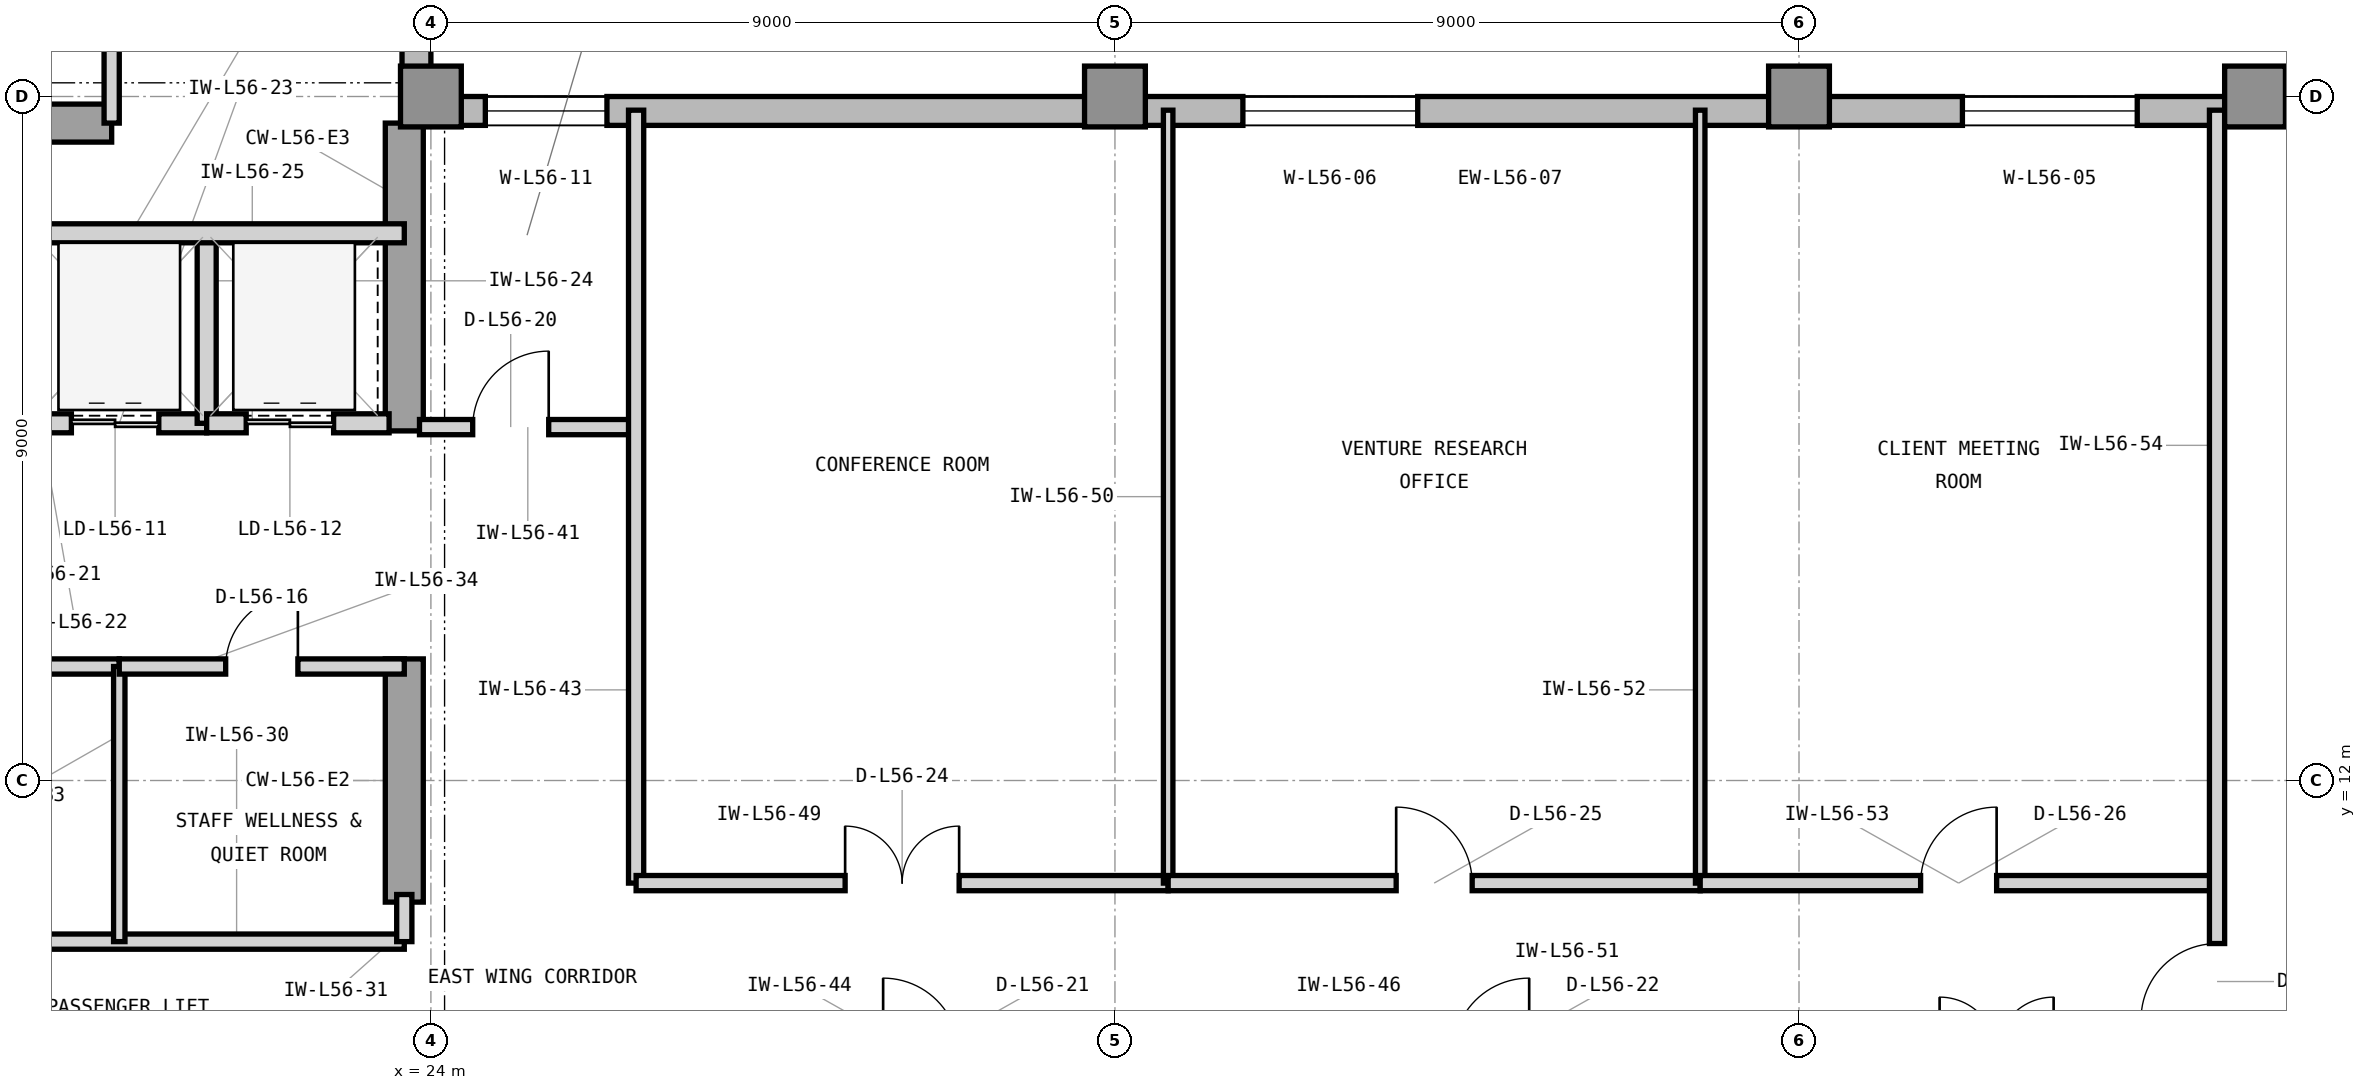
"""IFC4 building model, lengths in metres.
Left out: names, types, materials, properties, quantities, classifications, styles, units other than length and angle.
Written with IfcOpenShell. Run it as: python <this file> out.ifc"""

import sys

from ifc_helpers import new_model, si_unit, direction, frame, frame_2d, origin, origin_2d, place, context, subcontext, project, spatial, rectangle, extrude, element, fill, save


model = new_model("IFC4")
c1 = context("Model", 3, precision=1e-05, world=origin(), true_north=direction((0.0, 1.0)))
c2 = subcontext(c1, "Body", "Model", "MODEL_VIEW")
j1 = project(units=[si_unit("LENGTHUNIT", "METRE"), si_unit("PLANEANGLEUNIT", "RADIAN")], contexts=[c1])
p1 = place(None, origin())
s1 = spatial("IfcSite", under=j1, at=p1, CompositionType="ELEMENT")
p2 = place(p1, origin())
s2 = spatial("IfcBuilding", under=s1, at=p2, CompositionType="ELEMENT")
p3 = place(p2, frame((0.0, 0.0, 231.3)))
s3 = spatial("IfcBuildingStorey", under=s2, at=p3, CompositionType="ELEMENT", Elevation=231.3)
p4 = place(p3, frame((7.475, 20.65, 0.0), z_axis=(0.0, 0.0, 1.0), x_axis=(1.0, 0.0, 0.0)))
e1 = element("IfcWall", 1, at=p4, inside=s3, PredefinedType="SHEAR", context=c2, shape_type="SweptSolid", body=[
    extrude(rectangle(XDim=12.325, YDim=0.5, at=frame_2d((6.163, 0.0))), origin(), (0.0, 0.0, 1.0), 3.9),
])
p5 = place(p3, frame((23.65, 10.4, 0.0), z_axis=(0.0, 0.0, 1.0), x_axis=(0.0, 1.0, 0.0)))
e2 = element("IfcWall", 2, at=p5, inside=s3, PredefinedType="SHEAR", context=c2, shape_type="SweptSolid", body=[
    extrude(rectangle(XDim=3.2, YDim=0.5, at=frame_2d((1.6, 0.0))), origin(), (0.0, 0.0, 1.0), 3.9),
])
p6 = place(p3, frame((23.65, 16.6, 0.0), z_axis=(0.0, 0.0, 1.0), x_axis=(0.0, 1.0, 0.0)))
e3 = element("IfcWall", 3, at=p6, inside=s3, PredefinedType="SHEAR", context=c2, shape_type="SweptSolid", body=[
    extrude(rectangle(XDim=4.05, YDim=0.5, at=frame_2d((2.025, 0.0))), origin(), (0.0, 0.0, 1.0), 3.9),
])
for number, where, z_axis, x_axis in (
    (4, (24.0, 21.0, 0.0), (0.0, 0.0, 1.0), (1.0, 0.0, 0.0)),
    (5, (33.0, 21.0, 0.0), (0.0, 0.0, 1.0), (1.0, 0.0, 0.0)),
    (6, (42.0, 21.0, 0.0), (0.0, 0.0, 1.0), (1.0, 0.0, 0.0)),
    (7, (48.0, 21.0, 0.0), (0.0, 0.0, 1.0), (1.0, 0.0, 0.0)),
):
    element("IfcColumn", number, at=place(p3, frame(where, z_axis=z_axis, x_axis=x_axis)), inside=s3, PredefinedType="COLUMN", context=c2, shape_type="SweptSolid", body=[
        extrude(rectangle(XDim=0.8, YDim=0.8, at=origin_2d()), origin(), (0.0, 0.0, 1.0), 3.9),
    ])
p7 = place(p3, frame((52.4, 20.81, 0.0), z_axis=(0.0, 0.0, 1.0), x_axis=(-1.0, 0.0, 0.0)))
e8 = element("IfcWall", 8, at=p7, inside=s3, PredefinedType="STANDARD", context=c2, shape_type="SweptSolid", body=[
    extrude(rectangle(XDim=28.4, YDim=0.38, at=frame_2d((14.2, 0.0))), origin(), (0.0, 0.0, 1.0), 3.7),
])
p8 = place(p7, frame((5.95, 0.0, 0.9)))
e9 = element("IfcOpeningElement", 9, at=p8, cuts=e8, PredefinedType="OPENING", context=c2, shape_type="SweptSolid", body=[
    extrude(rectangle(XDim=2.3, YDim=2.2, at=frame_2d((1.15, 1.1))), frame((0.0, 0.2, 0.0), z_axis=(0.0, -1.0, 0.0), x_axis=(1.0, 0.0, 0.0)), (0.0, 0.0, 1.0), 0.4),
])
p9 = place(p7, frame((15.417, 0.0, 0.9)))
e10 = element("IfcOpeningElement", 10, at=p9, cuts=e8, PredefinedType="OPENING", context=c2, shape_type="SweptSolid", body=[
    extrude(rectangle(XDim=2.3, YDim=2.2, at=frame_2d((1.15, 1.1))), frame((0.0, 0.2, 0.0), z_axis=(0.0, -1.0, 0.0), x_axis=(1.0, 0.0, 0.0)), (0.0, 0.0, 1.0), 0.4),
])
p10 = place(p7, frame((26.084, 0.0, 0.9)))
e11 = element("IfcOpeningElement", 11, at=p10, cuts=e8, PredefinedType="OPENING", context=c2, shape_type="SweptSolid", body=[
    extrude(rectangle(XDim=1.6, YDim=2.2, at=frame_2d((0.8, 1.1))), frame((0.0, 0.2, 0.0), z_axis=(0.0, -1.0, 0.0), x_axis=(1.0, 0.0, 0.0)), (0.0, 0.0, 1.0), 0.4),
])
p11 = place(p3, frame((23.81, 21.0, 0.0), z_axis=(0.0, 0.0, 1.0), x_axis=(0.0, 1.0, 0.0)))
e12 = element("IfcWall", 12, at=p11, inside=s3, PredefinedType="STANDARD", context=c2, shape_type="SweptSolid", body=[
    extrude(rectangle(XDim=19.4, YDim=0.38, at=frame_2d((9.7, 0.0))), origin(), (0.0, 0.0, 1.0), 3.7),
])
p12 = place(p11, frame((10.975, 0.0, 0.9)))
e13 = element("IfcOpeningElement", 13, at=p12, cuts=e12, PredefinedType="OPENING", context=c2, shape_type="SweptSolid", body=[
    extrude(rectangle(XDim=2.3, YDim=2.2, at=frame_2d((1.15, 1.1))), frame((0.0, 0.2, 0.0), z_axis=(0.0, -1.0, 0.0), x_axis=(1.0, 0.0, 0.0)), (0.0, 0.0, 1.0), 0.4),
])
p13 = place(p3, frame((18.75, 16.7, 0.0), z_axis=(0.0, 0.0, 1.0), x_axis=(1.0, 0.0, 0.0)))
e14 = element("IfcWall", 14, at=p13, inside=s3, PredefinedType="PARTITIONING", context=c2, shape_type="SweptSolid", body=[
    extrude(rectangle(XDim=2.3, YDim=0.25, at=frame_2d((1.15, 0.0))), origin(), (0.0, 0.0, 1.0), 3.073),
])
p14 = place(p13, frame((0.52, 0.0, 0.0)))
e15 = element("IfcOpeningElement", 15, at=p14, cuts=e14, PredefinedType="OPENING", context=c2, shape_type="SweptSolid", body=[
    extrude(rectangle(XDim=1.15, YDim=2.25, at=frame_2d((0.575, 1.125))), frame((0.0, 0.135, 0.0), z_axis=(0.0, -1.0, 0.0), x_axis=(1.0, 0.0, 0.0)), (0.0, 0.0, 1.0), 0.27),
])
p15 = place(p3, frame((21.05, 16.7, 0.0), z_axis=(0.0, 0.0, 1.0), x_axis=(0.0, 1.0, 0.0)))
e16 = element("IfcWall", 16, at=p15, inside=s3, PredefinedType="PARTITIONING", context=c2, shape_type="SweptSolid", body=[
    extrude(rectangle(XDim=2.5, YDim=0.25, at=frame_2d((1.25, 0.0))), origin(), (0.0, 0.0, 1.0), 3.69),
])
p16 = place(p3, frame((21.05, 16.7, 0.0), z_axis=(0.0, 0.0, 1.0), x_axis=(1.0, 0.0, 0.0)))
e17 = element("IfcWall", 17, at=p16, inside=s3, PredefinedType="PARTITIONING", context=c2, shape_type="SweptSolid", body=[
    extrude(rectangle(XDim=2.4, YDim=0.25, at=frame_2d((1.2, 0.0))), origin(), (0.0, 0.0, 1.0), 3.073),
])
p17 = place(p16, frame((0.52, 0.0, 0.0)))
e18 = element("IfcOpeningElement", 18, at=p17, cuts=e17, PredefinedType="OPENING", context=c2, shape_type="SweptSolid", body=[
    extrude(rectangle(XDim=1.15, YDim=2.25, at=frame_2d((0.575, 1.125))), frame((0.0, 0.135, 0.0), z_axis=(0.0, -1.0, 0.0), x_axis=(1.0, 0.0, 0.0)), (0.0, 0.0, 1.0), 0.27),
])
p18 = place(p3, frame((16.45, 19.2, 0.0), z_axis=(0.0, 0.0, 1.0), x_axis=(1.0, 0.0, 0.0)))
e19 = element("IfcWall", 19, at=p18, inside=s3, PredefinedType="PARTITIONING", context=c2, shape_type="SweptSolid", body=[
    extrude(rectangle(XDim=7.2, YDim=0.25, at=frame_2d((3.6, 0.0))), origin(), (0.0, 0.0, 1.0), 3.69),
])
p19 = place(p3, frame((14.825, 9.88, 0.0), z_axis=(0.0, 0.0, 1.0), x_axis=(1.0, 0.0, 0.0)))
e20 = element("IfcWall", 20, at=p19, inside=s3, PredefinedType="PARTITIONING", context=c2, shape_type="SweptSolid", body=[
    extrude(rectangle(XDim=8.825, YDim=0.2, at=frame_2d((4.413, 0.0))), origin(), (0.0, 0.0, 1.0), 3.69),
])
p20 = place(p3, frame((23.65, 9.88, 0.0), z_axis=(0.0, 0.0, 1.0), x_axis=(0.0, 1.0, 0.0)))
e21 = element("IfcWall", 21, at=p20, inside=s3, PredefinedType="PARTITIONING", context=c2, shape_type="SweptSolid", body=[
    extrude(rectangle(XDim=0.62, YDim=0.2, at=frame_2d((0.31, 0.0))), origin(), (0.0, 0.0, 1.0), 3.69),
])
p21 = place(p3, frame((14.7, 13.5, 0.0), z_axis=(0.0, 0.0, 1.0), x_axis=(1.0, 0.0, 0.0)))
e22 = element("IfcWall", 22, at=p21, inside=s3, PredefinedType="PARTITIONING", context=c2, shape_type="SweptSolid", body=[
    extrude(rectangle(XDim=5.2, YDim=0.2, at=frame_2d((2.6, 0.0))), origin(), (0.0, 0.0, 1.0), 3.073),
])
p22 = place(p21, frame((2.125, 0.0, 0.0)))
e23 = element("IfcOpeningElement", 23, at=p22, cuts=e22, PredefinedType="OPENING", context=c2, shape_type="SweptSolid", body=[
    extrude(rectangle(XDim=0.95, YDim=2.1, at=frame_2d((0.475, 1.05))), frame((0.0, 0.11, 0.0), z_axis=(0.0, -1.0, 0.0), x_axis=(1.0, 0.0, 0.0)), (0.0, 0.0, 1.0), 0.22),
])
p23 = place(p3, frame((19.9, 9.88, 0.0), z_axis=(0.0, 0.0, 1.0), x_axis=(0.0, 1.0, 0.0)))
e24 = element("IfcWall", 24, at=p23, inside=s3, PredefinedType="PARTITIONING", context=c2, shape_type="SweptSolid", body=[
    extrude(rectangle(XDim=3.62, YDim=0.15, at=frame_2d((1.81, 0.0))), origin(), (0.0, 0.0, 1.0), 3.69),
])
p24 = place(p3, frame((19.9, 13.5, 0.0), z_axis=(0.0, 0.0, 1.0), x_axis=(1.0, 0.0, 0.0)))
e25 = element("IfcWall", 25, at=p24, inside=s3, PredefinedType="PARTITIONING", context=c2, shape_type="SweptSolid", body=[
    extrude(rectangle(XDim=3.75, YDim=0.2, at=frame_2d((1.875, 0.0))), origin(), (0.0, 0.0, 1.0), 3.073),
])
p25 = place(p24, frame((1.4, 0.0, 0.0)))
e26 = element("IfcOpeningElement", 26, at=p25, cuts=e25, PredefinedType="OPENING", context=c2, shape_type="SweptSolid", body=[
    extrude(rectangle(XDim=0.95, YDim=2.1, at=frame_2d((0.475, 1.05))), frame((0.0, 0.11, 0.0), z_axis=(0.0, -1.0, 0.0), x_axis=(1.0, 0.0, 0.0)), (0.0, 0.0, 1.0), 0.22),
])
p26 = place(p3, frame((23.85, 16.65, 0.0), z_axis=(0.0, 0.0, 1.0), x_axis=(1.0, 0.0, 0.0)))
e27 = element("IfcWall", 27, at=p26, inside=s3, PredefinedType="PARTITIONING", context=c2, shape_type="SweptSolid", body=[
    extrude(rectangle(XDim=2.85, YDim=0.2, at=frame_2d((1.425, 0.0))), origin(), (0.0, 0.0, 1.0), 3.69),
])
p27 = place(p26, frame((0.7, 0.0, 0.0)))
e28 = element("IfcOpeningElement", 28, at=p27, cuts=e27, PredefinedType="OPENING", context=c2, shape_type="SweptSolid", body=[
    extrude(rectangle(XDim=1.0, YDim=2.15, at=frame_2d((0.5, 1.075))), frame((0.0, 0.11, 0.0), z_axis=(0.0, -1.0, 0.0), x_axis=(1.0, 0.0, 0.0)), (0.0, 0.0, 1.0), 0.22),
])
p28 = place(p3, frame((26.7, 10.65, 0.0), z_axis=(0.0, 0.0, 1.0), x_axis=(0.0, 1.0, 0.0)))
e29 = element("IfcWall", 29, at=p28, inside=s3, PredefinedType="PARTITIONING", context=c2, shape_type="SweptSolid", body=[
    extrude(rectangle(XDim=10.17, YDim=0.2, at=frame_2d((5.085, 0.0))), origin(), (0.0, 0.0, 1.0), 3.69),
])
p29 = place(p3, frame((26.7, 10.65, 0.0), z_axis=(0.0, 0.0, 1.0), x_axis=(1.0, 0.0, 0.0)))
e30 = element("IfcWall", 30, at=p29, inside=s3, PredefinedType="PARTITIONING", context=c2, shape_type="SweptSolid", body=[
    extrude(rectangle(XDim=7.0, YDim=0.2, at=frame_2d((3.5, 0.0))), origin(), (0.0, 0.0, 1.0), 3.69),
])
p30 = place(p29, frame((2.75, 0.0, 0.0)))
e31 = element("IfcOpeningElement", 31, at=p30, cuts=e30, PredefinedType="OPENING", context=c2, shape_type="SweptSolid", body=[
    extrude(rectangle(XDim=1.5, YDim=2.3, at=frame_2d((0.75, 1.15))), frame((0.0, 0.11, 0.0), z_axis=(0.0, -1.0, 0.0), x_axis=(1.0, 0.0, 0.0)), (0.0, 0.0, 1.0), 0.22),
])
p31 = place(p3, frame((33.7, 10.65, 0.0), z_axis=(0.0, 0.0, 1.0), x_axis=(0.0, 1.0, 0.0)))
e32 = element("IfcWall", 32, at=p31, inside=s3, PredefinedType="PARTITIONING", context=c2, shape_type="SweptSolid", body=[
    extrude(rectangle(XDim=10.17, YDim=0.125, at=frame_2d((5.085, 0.0))), origin(), (0.0, 0.0, 1.0), 3.69),
])
p32 = place(p3, frame((33.7, 10.65, 0.0), z_axis=(0.0, 0.0, 1.0), x_axis=(1.0, 0.0, 0.0)))
e33 = element("IfcWall", 33, at=p32, inside=s3, PredefinedType="PARTITIONING", context=c2, shape_type="SweptSolid", body=[
    extrude(rectangle(XDim=7.0, YDim=0.2, at=frame_2d((3.5, 0.0))), origin(), (0.0, 0.0, 1.0), 3.69),
])
p33 = place(p32, frame((3.0, 0.0, 0.0)))
e34 = element("IfcOpeningElement", 34, at=p33, cuts=e33, PredefinedType="OPENING", context=c2, shape_type="SweptSolid", body=[
    extrude(rectangle(XDim=1.0, YDim=2.15, at=frame_2d((0.5, 1.075))), frame((0.0, 0.11, 0.0), z_axis=(0.0, -1.0, 0.0), x_axis=(1.0, 0.0, 0.0)), (0.0, 0.0, 1.0), 0.22),
])
p34 = place(p3, frame((40.7, 10.65, 0.0), z_axis=(0.0, 0.0, 1.0), x_axis=(0.0, 1.0, 0.0)))
e35 = element("IfcWall", 35, at=p34, inside=s3, PredefinedType="PARTITIONING", context=c2, shape_type="SweptSolid", body=[
    extrude(rectangle(XDim=10.17, YDim=0.125, at=frame_2d((5.085, 0.0))), origin(), (0.0, 0.0, 1.0), 3.69),
])
p35 = place(p3, frame((40.7, 10.65, 0.0), z_axis=(0.0, 0.0, 1.0), x_axis=(1.0, 0.0, 0.0)))
e36 = element("IfcWall", 36, at=p35, inside=s3, PredefinedType="PARTITIONING", context=c2, shape_type="SweptSolid", body=[
    extrude(rectangle(XDim=6.8, YDim=0.2, at=frame_2d((3.4, 0.0))), origin(), (0.0, 0.0, 1.0), 3.69),
])
p36 = place(p35, frame((2.9, 0.0, 0.0)))
e37 = element("IfcOpeningElement", 37, at=p36, cuts=e36, PredefinedType="OPENING", context=c2, shape_type="SweptSolid", body=[
    extrude(rectangle(XDim=1.0, YDim=2.15, at=frame_2d((0.5, 1.075))), frame((0.0, 0.11, 0.0), z_axis=(0.0, -1.0, 0.0), x_axis=(1.0, 0.0, 0.0)), (0.0, 0.0, 1.0), 0.22),
])
p37 = place(p3, frame((47.5, 3.18, 0.0), z_axis=(0.0, 0.0, 1.0), x_axis=(0.0, 1.0, 0.0)))
e38 = element("IfcWall", 38, at=p37, inside=s3, PredefinedType="PARTITIONING", context=c2, shape_type="SweptSolid", body=[
    extrude(rectangle(XDim=17.64, YDim=0.2, at=frame_2d((8.82, 0.0))), origin(), (0.0, 0.0, 1.0), 3.69),
])
p38 = place(p37, frame((5.675, 0.0, 0.0)))
e39 = element("IfcOpeningElement", 39, at=p38, cuts=e38, PredefinedType="OPENING", context=c2, shape_type="SweptSolid", body=[
    extrude(rectangle(XDim=1.0, YDim=2.15, at=frame_2d((0.5, 1.075))), frame((0.0, 0.11, 0.0), z_axis=(0.0, -1.0, 0.0), x_axis=(1.0, 0.0, 0.0)), (0.0, 0.0, 1.0), 0.22),
])
p39 = place(p3, frame((19.8, 20.65, 0.0), z_axis=(0.0, 0.0, 1.0), x_axis=(0.0, 1.0, 0.0)))
e40 = element("IfcWall", 40, at=p39, inside=s3, PredefinedType="PARTITIONING", context=c2, shape_type="SweptSolid", body=[
    extrude(rectangle(XDim=6.15, YDim=0.2, at=frame_2d((3.075, 0.0))), origin(), (0.0, 0.0, 1.0), 3.69),
])
p40 = place(p8, origin())
e41 = element("IfcWindow", 41, at=p40, inside=s3, PartitioningType="SINGLE_PANEL", PredefinedType="WINDOW", context=c2, shape_type="SweptSolid", body=[
    extrude(rectangle(XDim=2.3, YDim=2.2, at=frame_2d((1.15, 1.1))), frame((0.0, 0.11, 0.0), z_axis=(0.0, -1.0, 0.0), x_axis=(1.0, 0.0, 0.0)), (0.0, 0.0, 1.0), 0.06),
])
fill(e9, e41)
p41 = place(p9, origin())
e42 = element("IfcWindow", 42, at=p41, inside=s3, PartitioningType="SINGLE_PANEL", PredefinedType="WINDOW", context=c2, shape_type="SweptSolid", body=[
    extrude(rectangle(XDim=2.3, YDim=2.2, at=frame_2d((1.15, 1.1))), frame((0.0, 0.11, 0.0), z_axis=(0.0, -1.0, 0.0), x_axis=(1.0, 0.0, 0.0)), (0.0, 0.0, 1.0), 0.06),
])
fill(e10, e42)
p42 = place(p14, origin())
e43 = element("IfcDoor", 43, at=p42, inside=s3, OperationType="DOUBLE_DOOR_SLIDING", PredefinedType="DOOR", context=c2, shape_type="SweptSolid", body=[
    extrude(rectangle(XDim=1.15, YDim=2.25, at=frame_2d((0.575, 1.125))), frame((0.0, 0.025, 0.0), z_axis=(0.0, -1.0, 0.0), x_axis=(1.0, 0.0, 0.0)), (0.0, 0.0, 1.0), 0.05),
])
fill(e15, e43)
p43 = place(p17, origin())
e44 = element("IfcDoor", 44, at=p43, inside=s3, OperationType="DOUBLE_DOOR_SLIDING", PredefinedType="DOOR", context=c2, shape_type="SweptSolid", body=[
    extrude(rectangle(XDim=1.15, YDim=2.25, at=frame_2d((0.575, 1.125))), frame((0.0, 0.025, 0.0), z_axis=(0.0, -1.0, 0.0), x_axis=(1.0, 0.0, 0.0)), (0.0, 0.0, 1.0), 0.05),
])
fill(e18, e44)
p44 = place(p25, origin())
e45 = element("IfcDoor", 45, at=p44, inside=s3, OperationType="SINGLE_SWING_RIGHT", PredefinedType="DOOR", context=c2, shape_type="SweptSolid", body=[
    extrude(rectangle(XDim=0.95, YDim=2.1, at=frame_2d((0.475, 1.05))), frame((0.0, 0.025, 0.0), z_axis=(0.0, -1.0, 0.0), x_axis=(1.0, 0.0, 0.0)), (0.0, 0.0, 1.0), 0.05),
])
fill(e26, e45)
p45 = place(p27, origin())
e46 = element("IfcDoor", 46, at=p45, inside=s3, OperationType="SINGLE_SWING_RIGHT", PredefinedType="DOOR", context=c2, shape_type="SweptSolid", body=[
    extrude(rectangle(XDim=1.0, YDim=2.15, at=frame_2d((0.5, 1.075))), frame((0.0, 0.025, 0.0), z_axis=(0.0, -1.0, 0.0), x_axis=(1.0, 0.0, 0.0)), (0.0, 0.0, 1.0), 0.05),
])
fill(e28, e46)
p46 = place(p30, origin())
e47 = element("IfcDoor", 47, at=p46, inside=s3, OperationType="DOUBLE_DOOR_SINGLE_SWING", PredefinedType="DOOR", context=c2, shape_type="SweptSolid", body=[
    extrude(rectangle(XDim=1.5, YDim=2.3, at=frame_2d((0.75, 1.15))), frame((0.0, 0.025, 0.0), z_axis=(0.0, -1.0, 0.0), x_axis=(1.0, 0.0, 0.0)), (0.0, 0.0, 1.0), 0.05),
])
fill(e31, e47)
p47 = place(p33, origin())
e48 = element("IfcDoor", 48, at=p47, inside=s3, OperationType="SINGLE_SWING_LEFT", PredefinedType="DOOR", context=c2, shape_type="SweptSolid", body=[
    extrude(rectangle(XDim=1.0, YDim=2.15, at=frame_2d((0.5, 1.075))), frame((0.0, 0.025, 0.0), z_axis=(0.0, -1.0, 0.0), x_axis=(1.0, 0.0, 0.0)), (0.0, 0.0, 1.0), 0.05),
])
fill(e34, e48)
p48 = place(p36, origin())
e49 = element("IfcDoor", 49, at=p48, inside=s3, OperationType="SINGLE_SWING_RIGHT", PredefinedType="DOOR", context=c2, shape_type="SweptSolid", body=[
    extrude(rectangle(XDim=1.0, YDim=2.15, at=frame_2d((0.5, 1.075))), frame((0.0, 0.025, 0.0), z_axis=(0.0, -1.0, 0.0), x_axis=(1.0, 0.0, 0.0)), (0.0, 0.0, 1.0), 0.05),
])
fill(e37, e49)
p49 = place(p38, origin())
e50 = element("IfcDoor", 50, at=p49, inside=s3, OperationType="SINGLE_SWING_LEFT", PredefinedType="DOOR", context=c2, shape_type="SweptSolid", body=[
    extrude(rectangle(XDim=1.0, YDim=2.15, at=frame_2d((0.5, 1.075))), frame((0.0, 0.025, 0.0), z_axis=(0.0, -1.0, 0.0), x_axis=(1.0, 0.0, 0.0)), (0.0, 0.0, 1.0), 0.05),
])
fill(e39, e50)
p50 = place(p10, origin())
e51 = element("IfcWindow", 51, at=p50, inside=s3, PartitioningType="SINGLE_PANEL", PredefinedType="WINDOW", context=c2, shape_type="SweptSolid", body=[
    extrude(rectangle(XDim=1.6, YDim=2.2, at=frame_2d((0.8, 1.1))), frame((0.0, 0.11, 0.0), z_axis=(0.0, -1.0, 0.0), x_axis=(1.0, 0.0, 0.0)), (0.0, 0.0, 1.0), 0.06),
])
fill(e11, e51)
save(model, sys.argv[1])
